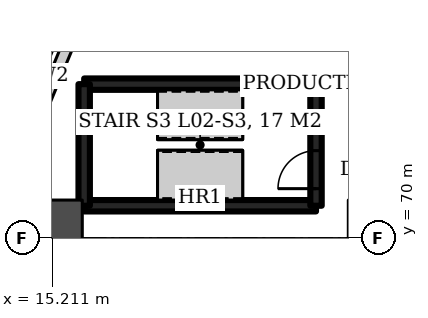
"""IFC4 building model, lengths in metres.
Left out: names, types, materials, properties, quantities, classifications, styles, units other than length and angle.
Written with IfcOpenShell. Run it as: python <this file> out.ifc"""

import sys

from ifc_helpers import new_model, si_unit, direction, frame, frame_2d, origin, origin_2d, place, context, subcontext, project, spatial, rectangle, extrude, element, fill, save


model = new_model("IFC4")
c1 = context("Model", 3, precision=1e-05, world=origin(), true_north=direction((0.0, 1.0)))
c2 = subcontext(c1, "Body", "Model", "MODEL_VIEW")
j1 = project(units=[si_unit("LENGTHUNIT", "METRE"), si_unit("PLANEANGLEUNIT", "RADIAN")], contexts=[c1])
p1 = place(None, origin())
s1 = spatial("IfcSite", under=j1, at=p1, CompositionType="ELEMENT")
p2 = place(p1, origin())
s2 = spatial("IfcBuilding", under=s1, at=p2, CompositionType="ELEMENT")
p3 = place(p2, frame((0.0, 0.0, 15.0)))
s3 = spatial("IfcBuildingStorey", under=s2, at=p3, CompositionType="ELEMENT", Elevation=15.0)
p4 = place(p3, frame((15.0, 70.0, 0.0), z_axis=(0.0, 0.0, 1.0), x_axis=(1.0, 0.0, 0.0)))
e1 = element("IfcColumn", 1, at=p4, inside=s3, PredefinedType="COLUMN", context=c2, shape_type="SweptSolid", body=[
    extrude(rectangle(XDim=2.0, YDim=2.0, at=origin_2d()), origin(), (0.0, 0.0, 1.0), 5.0),
])
p5 = place(p3, frame((15.734, 75.35, 0.0), z_axis=(0.0, 0.0, 1.0), x_axis=(-0.382709424419, -0.923868765822, 0.0)))
e2 = element("IfcWall", 2, at=p5, inside=s3, PredefinedType="SOLIDWALL", context=c2, shape_type="SweptSolid", body=[
    extrude(rectangle(XDim=2.793, YDim=0.3, at=frame_2d((1.397, 0.0))), origin(), (0.0, 0.0, 1.0), 4.7),
])
for number, where, z_axis, x_axis in (
    (3, (16.05, 70.85, 0.0), (0.0, 0.0, 1.0), (1.0, 0.0, 0.0)),
    (4, (16.05, 74.05, 0.0), (0.0, 0.0, 1.0), (1.0, 0.0, 0.0)),
):
    element("IfcWall", number, at=place(p3, frame(where, z_axis=z_axis, x_axis=x_axis)), inside=s3, PredefinedType="SHEAR", context=c2, shape_type="SweptSolid", body=[
        extrude(rectangle(XDim=6.1, YDim=0.3, at=frame_2d((3.05, 0.0))), origin(), (0.0, 0.0, 1.0), 5.0),
    ])
p6 = place(p3, frame((16.05, 70.85, 0.0), z_axis=(0.0, 0.0, 1.0), x_axis=(0.0, 1.0, 0.0)))
e5 = element("IfcWall", 5, at=p6, inside=s3, PredefinedType="SHEAR", context=c2, shape_type="SweptSolid", body=[
    extrude(rectangle(XDim=3.2, YDim=0.3, at=frame_2d((1.6, 0.0))), origin(), (0.0, 0.0, 1.0), 5.0),
])
p7 = place(p3, frame((22.15, 70.85, 0.0), z_axis=(0.0, 0.0, 1.0), x_axis=(0.0, 1.0, 0.0)))
e6 = element("IfcWall", 6, at=p7, inside=s3, PredefinedType="SHEAR", context=c2, shape_type="SweptSolid", body=[
    extrude(rectangle(XDim=3.2, YDim=0.3, at=frame_2d((1.6, 0.0))), origin(), (0.0, 0.0, 1.0), 5.0),
])
p8 = place(p7, frame((0.45, 0.0, 0.0)))
e7 = element("IfcOpeningElement", 7, at=p8, cuts=e6, PredefinedType="OPENING", context=c2, shape_type="SweptSolid", body=[
    extrude(rectangle(XDim=1.0, YDim=2.1, at=frame_2d((0.5, 1.05))), frame((0.0, 0.16, 0.0), z_axis=(0.0, -1.0, 0.0), x_axis=(1.0, 0.0, 0.0)), (0.0, 0.0, 1.0), 0.32),
])
p9 = place(p8, origin())
e8 = element("IfcDoor", 8, at=p9, inside=s3, OperationType="SINGLE_SWING_LEFT", PredefinedType="DOOR", context=c2, shape_type="SweptSolid", body=[
    extrude(rectangle(XDim=1.0, YDim=2.1, at=frame_2d((0.5, 1.05))), frame((0.0, 0.025, 0.0), z_axis=(0.0, -1.0, 0.0), x_axis=(1.0, 0.0, 0.0)), (0.0, 0.0, 1.0), 0.05),
])
fill(e7, e8)
save(model, sys.argv[1])
